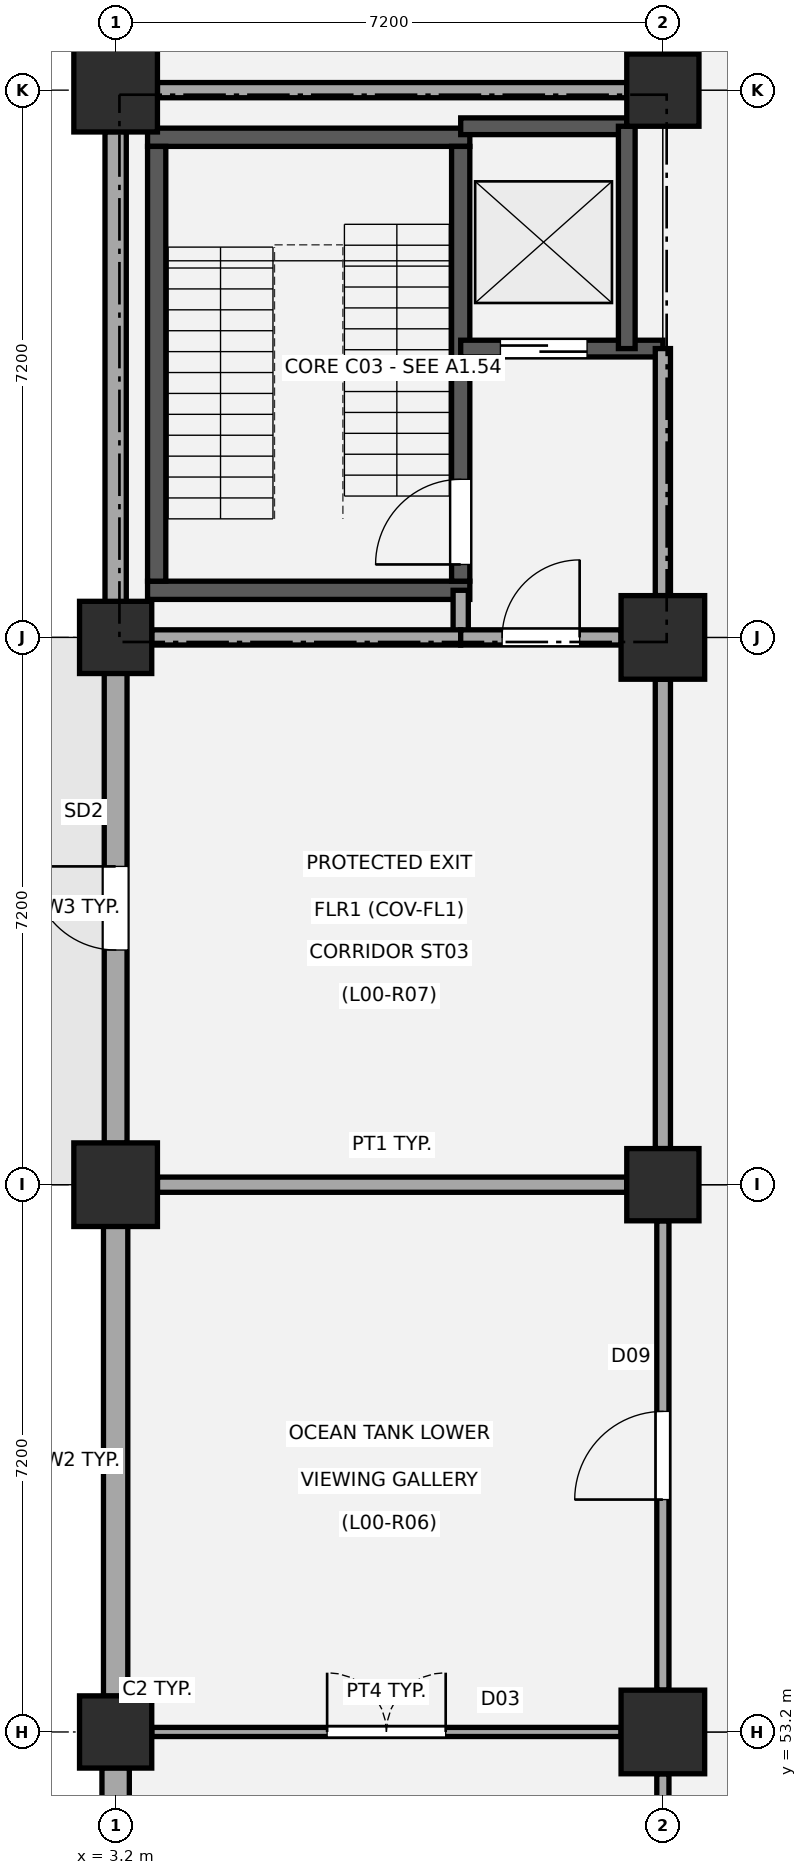
"""IFC4 building model, lengths in metres.
Left out: names, types, materials, properties, quantities, classifications, styles, units other than length and angle.
Written with IfcOpenShell. Run it as: python <this file> out.ifc"""

import sys

from ifc_helpers import new_model, si_unit, direction, frame, frame_2d, origin, origin_2d, place, context, subcontext, project, spatial, rectangle, extrude, element, fill, save


model = new_model("IFC4")
c1 = context("Model", 3, precision=1e-05, world=origin(), true_north=direction((0.0, 1.0)))
c2 = subcontext(c1, "Body", "Model", "MODEL_VIEW")
j1 = project(units=[si_unit("LENGTHUNIT", "METRE"), si_unit("PLANEANGLEUNIT", "RADIAN")], contexts=[c1])
p1 = place(None, origin())
s1 = spatial("IfcSite", under=j1, at=p1, CompositionType="ELEMENT")
p2 = place(p1, origin())
s2 = spatial("IfcBuilding", under=s1, at=p2, CompositionType="ELEMENT")
p3 = place(p2, origin())
s3 = spatial("IfcBuildingStorey", under=s2, at=p3, CompositionType="ELEMENT", Elevation=0.0)
p4 = place(p3, frame((3.2, 53.2, -0.35), z_axis=(0.0, 0.0, 1.0), x_axis=(1.0, 0.0, 0.0)))
e1 = element("IfcColumn", 1, at=p4, inside=s3, PredefinedType="COLUMN", context=c2, shape_type="SweptSolid", body=[
    extrude(rectangle(XDim=0.95, YDim=0.95, at=origin_2d()), origin(), (0.0, 0.0, 1.0), 5.03),
])
p5 = place(p3, frame((3.2, 60.4, -0.35), z_axis=(0.0, 0.0, 1.0), x_axis=(1.0, 0.0, 0.0)))
e2 = element("IfcColumn", 2, at=p5, inside=s3, PredefinedType="COLUMN", context=c2, shape_type="SweptSolid", body=[
    extrude(rectangle(XDim=1.1, YDim=1.1, at=origin_2d()), origin(), (0.0, 0.0, 1.0), 5.03),
])
p6 = place(p3, frame((3.2, 67.6, -0.35), z_axis=(0.0, 0.0, 1.0), x_axis=(1.0, 0.0, 0.0)))
e3 = element("IfcColumn", 3, at=p6, inside=s3, PredefinedType="COLUMN", context=c2, shape_type="SweptSolid", body=[
    extrude(rectangle(XDim=0.95, YDim=0.95, at=origin_2d()), origin(), (0.0, 0.0, 1.0), 5.03),
])
for number, where, z_axis, x_axis in (
    (4, (3.2, 74.8, -0.35), (0.0, 0.0, 1.0), (1.0, 0.0, 0.0)),
    (5, (10.4, 53.2, -0.35), (0.0, 0.0, 1.0), (1.0, 0.0, 0.0)),
):
    element("IfcColumn", number, at=place(p3, frame(where, z_axis=z_axis, x_axis=x_axis)), inside=s3, PredefinedType="COLUMN", context=c2, shape_type="SweptSolid", body=[
        extrude(rectangle(XDim=1.1, YDim=1.1, at=origin_2d()), origin(), (0.0, 0.0, 1.0), 5.03),
    ])
p7 = place(p3, frame((10.4, 60.4, -0.35), z_axis=(0.0, 0.0, 1.0), x_axis=(1.0, 0.0, 0.0)))
e6 = element("IfcColumn", 6, at=p7, inside=s3, PredefinedType="COLUMN", context=c2, shape_type="SweptSolid", body=[
    extrude(rectangle(XDim=0.95, YDim=0.95, at=origin_2d()), origin(), (0.0, 0.0, 1.0), 5.03),
])
p8 = place(p3, frame((10.4, 67.6, -0.35), z_axis=(0.0, 0.0, 1.0), x_axis=(1.0, 0.0, 0.0)))
e7 = element("IfcColumn", 7, at=p8, inside=s3, PredefinedType="COLUMN", context=c2, shape_type="SweptSolid", body=[
    extrude(rectangle(XDim=1.1, YDim=1.1, at=origin_2d()), origin(), (0.0, 0.0, 1.0), 5.03),
])
p9 = place(p3, frame((10.4, 74.8, -0.35), z_axis=(0.0, 0.0, 1.0), x_axis=(1.0, 0.0, 0.0)))
e8 = element("IfcColumn", 8, at=p9, inside=s3, PredefinedType="COLUMN", context=c2, shape_type="SweptSolid", body=[
    extrude(rectangle(XDim=0.95, YDim=0.95, at=origin_2d()), origin(), (0.0, 0.0, 1.0), 5.03),
])
p10 = place(p3, frame((3.2, 46.545, 0.0), z_axis=(0.0, 0.0, 1.0), x_axis=(0.0, 1.0, 0.0)))
e9 = element("IfcWall", 9, at=p10, inside=s3, PredefinedType="STANDARD", context=c2, shape_type="SweptSolid", body=[
    extrude(rectangle(XDim=6.185, YDim=0.36, at=frame_2d((3.093, 0.0))), origin(), (0.0, 0.0, 1.0), 2.47),
])
p11 = place(p3, frame((3.2, 53.67, 0.0), z_axis=(0.0, 0.0, 1.0), x_axis=(0.0, 1.0, 0.0)))
e10 = element("IfcWall", 10, at=p11, inside=s3, PredefinedType="STANDARD", context=c2, shape_type="SweptSolid", body=[
    extrude(rectangle(XDim=6.185, YDim=0.32, at=frame_2d((3.093, 0.0))), origin(), (0.0, 0.0, 1.0), 2.47),
])
p12 = place(p3, frame((3.2, 60.945, 0.0), z_axis=(0.0, 0.0, 1.0), x_axis=(0.0, 1.0, 0.0)))
e11 = element("IfcWall", 11, at=p12, inside=s3, PredefinedType="STANDARD", context=c2, shape_type="SweptSolid", body=[
    extrude(rectangle(XDim=6.185, YDim=0.3, at=frame_2d((3.092, 0.0))), origin(), (0.0, 0.0, 1.0), 2.47),
])
p13 = place(p12, frame((2.542, 0.0, 0.0)))
e12 = element("IfcOpeningElement", 12, at=p13, cuts=e11, PredefinedType="OPENING", context=c2, shape_type="SweptSolid", body=[
    extrude(rectangle(XDim=1.1, YDim=2.15, at=frame_2d((0.55, 1.075))), frame((0.0, 0.16, 0.0), z_axis=(0.0, -1.0, 0.0), x_axis=(1.0, 0.0, 0.0)), (0.0, 0.0, 1.0), 0.32),
])
p14 = place(p3, frame((3.2, 68.07, 0.0), z_axis=(0.0, 0.0, 1.0), x_axis=(0.0, 1.0, 0.0)))
e13 = element("IfcWall", 13, at=p14, inside=s3, PredefinedType="STANDARD", context=c2, shape_type="SweptSolid", body=[
    extrude(rectangle(XDim=6.185, YDim=0.28, at=frame_2d((3.092, 0.0))), origin(), (0.0, 0.0, 1.0), 2.47),
])
for number, where, z_axis, x_axis in (
    (14, (3.62, 68.22, 0.0), (0.0, 0.0, 1.0), (1.0, 0.0, 0.0)),
    (15, (3.62, 74.18, 0.0), (0.0, 0.0, 1.0), (1.0, 0.0, 0.0)),
):
    element("IfcWall", number, at=place(p3, frame(where, z_axis=z_axis, x_axis=x_axis)), inside=s3, PredefinedType="SHEAR", context=c2, shape_type="SweptSolid", body=[
        extrude(rectangle(XDim=4.24, YDim=0.24, at=frame_2d((2.12, 0.0))), origin(), (0.0, 0.0, 1.0), 3.48),
    ])
p15 = place(p3, frame((3.74, 68.34, 0.0), z_axis=(0.0, 0.0, 1.0), x_axis=(0.0, 1.0, 0.0)))
e16 = element("IfcWall", 16, at=p15, inside=s3, PredefinedType="SHEAR", context=c2, shape_type="SweptSolid", body=[
    extrude(rectangle(XDim=5.72, YDim=0.24, at=frame_2d((2.86, 0.0))), origin(), (0.0, 0.0, 1.0), 3.48),
])
p16 = place(p3, frame((7.74, 68.34, 0.0), z_axis=(0.0, 0.0, 1.0), x_axis=(0.0, 1.0, 0.0)))
e17 = element("IfcWall", 17, at=p16, inside=s3, PredefinedType="SHEAR", context=c2, shape_type="SweptSolid", body=[
    extrude(rectangle(XDim=5.72, YDim=0.24, at=frame_2d((2.86, 0.0))), origin(), (0.0, 0.0, 1.0), 3.48),
])
p17 = place(p16, frame((0.22, 0.0, 0.0)))
e18 = element("IfcOpeningElement", 18, at=p17, cuts=e17, PredefinedType="OPENING", context=c2, shape_type="SweptSolid", body=[
    extrude(rectangle(XDim=1.12, YDim=2.15, at=frame_2d((0.56, 1.075))), frame((0.0, 0.13, 0.0), z_axis=(0.0, -1.0, 0.0), x_axis=(1.0, 0.0, 0.0)), (0.0, 0.0, 1.0), 0.26),
])
p18 = place(p3, frame((7.74, 71.4, 0.0), z_axis=(0.0, 0.0, 1.0), x_axis=(1.0, 0.0, 0.0)))
e19 = element("IfcWall", 19, at=p18, inside=s3, PredefinedType="SHEAR", context=c2, shape_type="SweptSolid", body=[
    extrude(rectangle(XDim=2.66, YDim=0.22, at=frame_2d((1.33, 0.0))), origin(), (0.0, 0.0, 1.0), 3.48),
])
p19 = place(p18, frame((0.522, 0.0, 0.0)))
e20 = element("IfcOpeningElement", 20, at=p19, cuts=e19, PredefinedType="OPENING", context=c2, shape_type="SweptSolid", body=[
    extrude(rectangle(XDim=1.14, YDim=2.15, at=frame_2d((0.57, 1.075))), frame((0.0, 0.12, 0.0), z_axis=(0.0, -1.0, 0.0), x_axis=(1.0, 0.0, 0.0)), (0.0, 0.0, 1.0), 0.24),
])
p20 = place(p3, frame((7.74, 74.325, 0.0), z_axis=(0.0, 0.0, 1.0), x_axis=(1.0, 0.0, 0.0)))
e21 = element("IfcWall", 21, at=p20, inside=s3, PredefinedType="SHEAR", context=c2, shape_type="SweptSolid", body=[
    extrude(rectangle(XDim=2.185, YDim=0.22, at=frame_2d((1.093, 0.0))), origin(), (0.0, 0.0, 1.0), 3.48),
])
p21 = place(p3, frame((9.925, 71.4, 0.0), z_axis=(0.0, 0.0, 1.0), x_axis=(0.0, 1.0, 0.0)))
e22 = element("IfcWall", 22, at=p21, inside=s3, PredefinedType="SHEAR", context=c2, shape_type="SweptSolid", body=[
    extrude(rectangle(XDim=2.925, YDim=0.22, at=frame_2d((1.462, 0.0))), origin(), (0.0, 0.0, 1.0), 3.48),
])
p22 = place(p3, frame((7.74, 67.6, 0.0), z_axis=(0.0, 0.0, 1.0), x_axis=(0.0, 1.0, 0.0)))
e23 = element("IfcWall", 23, at=p22, inside=s3, PredefinedType="PARTITIONING", context=c2, shape_type="SweptSolid", body=[
    extrude(rectangle(XDim=0.62, YDim=0.2, at=frame_2d((0.31, 0.0))), origin(), (0.0, 0.0, 1.0), 2.37),
])
p23 = place(p3, frame((10.4, 68.15, 0.0), z_axis=(0.0, 0.0, 1.0), x_axis=(0.0, 1.0, 0.0)))
e24 = element("IfcWall", 24, at=p23, inside=s3, PredefinedType="PARTITIONING", context=c2, shape_type="SweptSolid", body=[
    extrude(rectangle(XDim=3.25, YDim=0.2, at=frame_2d((1.625, 0.0))), origin(), (0.0, 0.0, 1.0), 2.47),
])
p24 = place(p3, frame((3.675, 67.6, 0.0), z_axis=(0.0, 0.0, 1.0), x_axis=(1.0, 0.0, 0.0)))
e25 = element("IfcWall", 25, at=p24, inside=s3, PredefinedType="PARTITIONING", context=c2, shape_type="SweptSolid", body=[
    extrude(rectangle(XDim=4.065, YDim=0.2, at=frame_2d((2.032, 0.0))), origin(), (0.0, 0.0, 1.0), 2.37),
])
p25 = place(p3, frame((7.74, 67.6, 0.0), z_axis=(0.0, 0.0, 1.0), x_axis=(1.0, 0.0, 0.0)))
e26 = element("IfcWall", 26, at=p25, inside=s3, PredefinedType="PARTITIONING", context=c2, shape_type="SweptSolid", body=[
    extrude(rectangle(XDim=2.11, YDim=0.2, at=frame_2d((1.055, 0.0))), origin(), (0.0, 0.0, 1.0), 2.37),
])
p26 = place(p25, frame((0.545, 0.0, 0.0)))
e27 = element("IfcOpeningElement", 27, at=p26, cuts=e26, PredefinedType="OPENING", context=c2, shape_type="SweptSolid", body=[
    extrude(rectangle(XDim=1.02, YDim=2.15, at=frame_2d((0.51, 1.075))), frame((0.0, 0.11, 0.0), z_axis=(0.0, -1.0, 0.0), x_axis=(1.0, 0.0, 0.0)), (0.0, 0.0, 1.0), 0.22),
])
p27 = place(p3, frame((3.75, 74.8, 0.0), z_axis=(0.0, 0.0, 1.0), x_axis=(1.0, 0.0, 0.0)))
e28 = element("IfcWall", 28, at=p27, inside=s3, PredefinedType="PARTITIONING", context=c2, shape_type="SweptSolid", body=[
    extrude(rectangle(XDim=6.175, YDim=0.2, at=frame_2d((3.087, 0.0))), origin(), (0.0, 0.0, 1.0), 2.37),
])
p28 = place(p3, frame((10.4, 46.475, 0.0), z_axis=(0.0, 0.0, 1.0), x_axis=(0.0, 1.0, 0.0)))
e29 = element("IfcWall", 29, at=p28, inside=s3, PredefinedType="PARTITIONING", context=c2, shape_type="SweptSolid", body=[
    extrude(rectangle(XDim=6.175, YDim=0.16, at=frame_2d((3.087, 0.0))), origin(), (0.0, 0.0, 1.0), 2.47),
])
p29 = place(p28, frame((2.597, 0.0, 0.0)))
e30 = element("IfcOpeningElement", 30, at=p29, cuts=e29, PredefinedType="OPENING", context=c2, shape_type="SweptSolid", body=[
    extrude(rectangle(XDim=0.98, YDim=2.12, at=frame_2d((0.49, 1.06))), frame((0.0, 0.09, 0.0), z_axis=(0.0, -1.0, 0.0), x_axis=(1.0, 0.0, 0.0)), (0.0, 0.0, 1.0), 0.18),
])
p30 = place(p3, frame((3.675, 53.2, 0.0), z_axis=(0.0, 0.0, 1.0), x_axis=(1.0, 0.0, 0.0)))
e31 = element("IfcWall", 31, at=p30, inside=s3, PredefinedType="PARTITIONING", context=c2, shape_type="SweptSolid", body=[
    extrude(rectangle(XDim=6.175, YDim=0.12, at=frame_2d((3.087, 0.0))), origin(), (0.0, 0.0, 1.0), 2.37),
])
p31 = place(p30, frame((2.308, 0.0, 0.0)))
e32 = element("IfcOpeningElement", 32, at=p31, cuts=e31, PredefinedType="OPENING", context=c2, shape_type="SweptSolid", body=[
    extrude(rectangle(XDim=1.56, YDim=2.2, at=frame_2d((0.78, 1.1))), frame((0.0, 0.07, 0.0), z_axis=(0.0, -1.0, 0.0), x_axis=(1.0, 0.0, 0.0)), (0.0, 0.0, 1.0), 0.14),
])
p32 = place(p3, frame((10.4, 53.75, 0.0), z_axis=(0.0, 0.0, 1.0), x_axis=(0.0, 1.0, 0.0)))
e33 = element("IfcWall", 33, at=p32, inside=s3, PredefinedType="PARTITIONING", context=c2, shape_type="SweptSolid", body=[
    extrude(rectangle(XDim=6.175, YDim=0.16, at=frame_2d((3.087, 0.0))), origin(), (0.0, 0.0, 1.0), 2.47),
])
p33 = place(p32, frame((2.508, 0.0, 0.0)))
e34 = element("IfcOpeningElement", 34, at=p33, cuts=e33, PredefinedType="OPENING", context=c2, shape_type="SweptSolid", body=[
    extrude(rectangle(XDim=1.16, YDim=2.18, at=frame_2d((0.58, 1.09))), frame((0.0, 0.09, 0.0), z_axis=(0.0, -1.0, 0.0), x_axis=(1.0, 0.0, 0.0)), (0.0, 0.0, 1.0), 0.18),
])
p34 = place(p3, frame((3.75, 60.4, 0.0), z_axis=(0.0, 0.0, 1.0), x_axis=(1.0, 0.0, 0.0)))
e35 = element("IfcWall", 35, at=p34, inside=s3, PredefinedType="PARTITIONING", context=c2, shape_type="SweptSolid", body=[
    extrude(rectangle(XDim=6.175, YDim=0.2, at=frame_2d((3.087, 0.0))), origin(), (0.0, 0.0, 1.0), 2.37),
])
p35 = place(p3, frame((10.4, 60.875, 0.0), z_axis=(0.0, 0.0, 1.0), x_axis=(0.0, 1.0, 0.0)))
e36 = element("IfcWall", 36, at=p35, inside=s3, PredefinedType="PARTITIONING", context=c2, shape_type="SweptSolid", body=[
    extrude(rectangle(XDim=6.175, YDim=0.2, at=frame_2d((3.087, 0.0))), origin(), (0.0, 0.0, 1.0), 2.47),
])
p36 = place(p3, frame((10.4, 75.275, 0.0), z_axis=(0.0, 0.0, 1.0), x_axis=(0.0, 1.0, 0.0)))
e37 = element("IfcWall", 37, at=p36, inside=s3, PredefinedType="PARTITIONING", context=c2, shape_type="SweptSolid", body=[
    extrude(rectangle(XDim=6.175, YDim=0.16, at=frame_2d((3.087, 0.0))), origin(), (0.0, 0.0, 1.0), 2.47),
])
p37 = place(p36, frame((2.508, 0.0, 0.0)))
e38 = element("IfcOpeningElement", 38, at=p37, cuts=e37, PredefinedType="OPENING", context=c2, shape_type="SweptSolid", body=[
    extrude(rectangle(XDim=1.16, YDim=2.18, at=frame_2d((0.58, 1.09))), frame((0.0, 0.09, 0.0), z_axis=(0.0, -1.0, 0.0), x_axis=(1.0, 0.0, 0.0)), (0.0, 0.0, 1.0), 0.18),
])
p38 = place(p13, origin())
e39 = element("IfcDoor", 39, at=p38, inside=s3, OperationType="SINGLE_SWING_RIGHT", PredefinedType="DOOR", context=c2, shape_type="SweptSolid", body=[
    extrude(rectangle(XDim=1.1, YDim=2.15, at=frame_2d((0.55, 1.075))), frame((0.0, 0.025, 0.0), z_axis=(0.0, -1.0, 0.0), x_axis=(1.0, 0.0, 0.0)), (0.0, 0.0, 1.0), 0.05),
])
fill(e12, e39)
p39 = place(p17, origin())
e40 = element("IfcDoor", 40, at=p39, inside=s3, OperationType="SINGLE_SWING_LEFT", PredefinedType="DOOR", context=c2, shape_type="SweptSolid", body=[
    extrude(rectangle(XDim=1.12, YDim=2.15, at=frame_2d((0.56, 1.075))), frame((0.0, 0.025, 0.0), z_axis=(0.0, -1.0, 0.0), x_axis=(1.0, 0.0, 0.0)), (0.0, 0.0, 1.0), 0.05),
])
fill(e18, e40)
p40 = place(p19, origin())
e41 = element("IfcDoor", 41, at=p40, inside=s3, OperationType="SLIDING_TO_LEFT", PredefinedType="DOOR", context=c2, shape_type="SweptSolid", body=[
    extrude(rectangle(XDim=1.14, YDim=2.15, at=frame_2d((0.57, 1.075))), frame((0.0, 0.025, 0.0), z_axis=(0.0, -1.0, 0.0), x_axis=(1.0, 0.0, 0.0)), (0.0, 0.0, 1.0), 0.05),
])
fill(e20, e41)
p41 = place(p26, origin())
e42 = element("IfcDoor", 42, at=p41, inside=s3, OperationType="SINGLE_SWING_RIGHT", PredefinedType="DOOR", context=c2, shape_type="SweptSolid", body=[
    extrude(rectangle(XDim=1.02, YDim=2.15, at=frame_2d((0.51, 1.075))), frame((0.0, 0.025, 0.0), z_axis=(0.0, -1.0, 0.0), x_axis=(1.0, 0.0, 0.0)), (0.0, 0.0, 1.0), 0.05),
])
fill(e27, e42)
p42 = place(p31, origin())
e43 = element("IfcDoor", 43, at=p42, inside=s3, OperationType="DOUBLE_DOOR_SINGLE_SWING", PredefinedType="DOOR", context=c2, shape_type="SweptSolid", body=[
    extrude(rectangle(XDim=1.56, YDim=2.2, at=frame_2d((0.78, 1.1))), frame((0.0, 0.025, 0.0), z_axis=(0.0, -1.0, 0.0), x_axis=(1.0, 0.0, 0.0)), (0.0, 0.0, 1.0), 0.05),
])
fill(e32, e43)
p43 = place(p33, origin())
e44 = element("IfcDoor", 44, at=p43, inside=s3, OperationType="SINGLE_SWING_LEFT", PredefinedType="DOOR", context=c2, shape_type="SweptSolid", body=[
    extrude(rectangle(XDim=1.16, YDim=2.18, at=frame_2d((0.58, 1.09))), frame((0.0, 0.025, 0.0), z_axis=(0.0, -1.0, 0.0), x_axis=(1.0, 0.0, 0.0)), (0.0, 0.0, 1.0), 0.05),
])
fill(e34, e44)
save(model, sys.argv[1])
